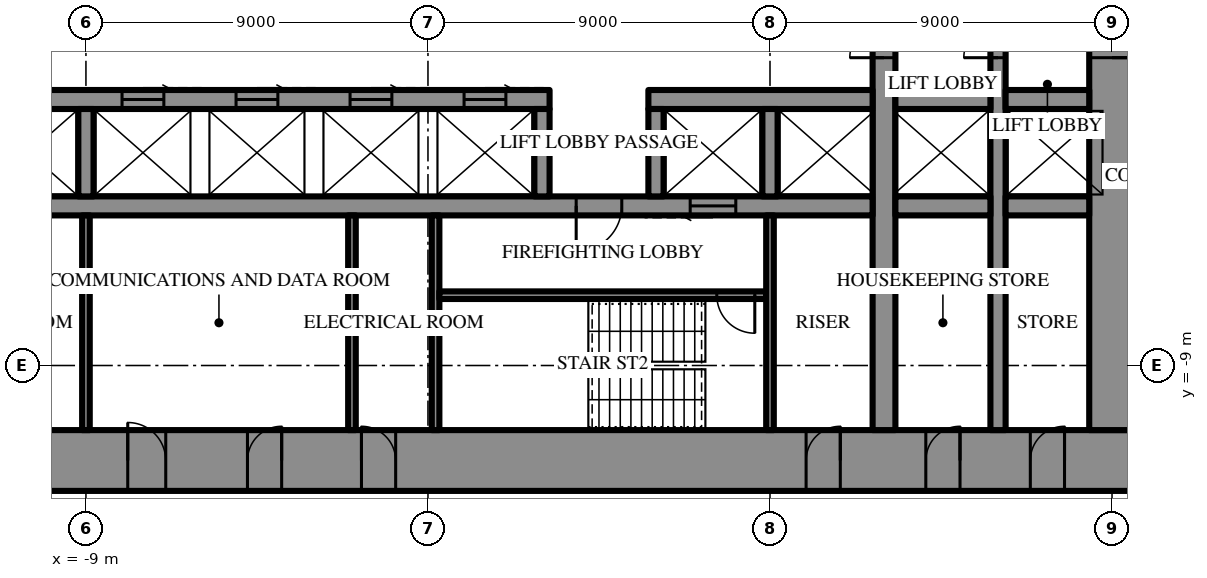
"""IFC4 building model, lengths in metres.
Left out: names, types, materials, properties, quantities, classifications, styles, units other than length and angle.
Written with IfcOpenShell. Run it as: python <this file> out.ifc"""

import sys

from ifc_helpers import new_model, si_unit, direction, frame, frame_2d, origin, place, context, subcontext, project, spatial, rectangle, extrude, element, fill, save


model = new_model("IFC4")
c1 = context("Model", 3, precision=1e-05, world=origin(), true_north=direction((0.0, 1.0)))
c2 = subcontext(c1, "Body", "Model", "MODEL_VIEW")
j1 = project(units=[si_unit("LENGTHUNIT", "METRE"), si_unit("PLANEANGLEUNIT", "RADIAN")], contexts=[c1])
p1 = place(None, origin())
s1 = spatial("IfcSite", under=j1, at=p1, CompositionType="ELEMENT")
p2 = place(p1, origin())
s2 = spatial("IfcBuilding", under=s1, at=p2, CompositionType="ELEMENT")
p3 = place(p2, frame((0.0, 0.0, 52.9)))
s3 = spatial("IfcBuildingStorey", under=s2, at=p3, CompositionType="ELEMENT", Elevation=52.9)
p4 = place(p3, frame((18.6, -11.5, 0.0), z_axis=(0.0, 0.0, 1.0), x_axis=(-1.0, 0.0, 0.0)))
e1 = element("IfcWall", 1, at=p4, inside=s3, PredefinedType="SHEAR", context=c2, shape_type="SweptSolid", body=[
    extrude(rectangle(XDim=37.2, YDim=1.6, at=frame_2d((18.6, 0.0))), origin(), (0.0, 0.0, 1.0), 4.2),
])
p5 = place(p4, frame((19.45, 0.0, 0.0)))
e2 = element("IfcOpeningElement", 2, at=p5, cuts=e1, PredefinedType="OPENING", context=c2, shape_type="SweptSolid", body=[
    extrude(rectangle(XDim=0.9, YDim=2.2, at=frame_2d((0.45, 1.1))), frame((0.0, 0.81, 0.0), z_axis=(0.0, -1.0, 0.0), x_axis=(1.0, 0.0, 0.0)), (0.0, 0.0, 1.0), 1.62),
])
p6 = place(p4, frame((22.45, 0.0, 0.0)))
e3 = element("IfcOpeningElement", 3, at=p6, cuts=e1, PredefinedType="OPENING", context=c2, shape_type="SweptSolid", body=[
    extrude(rectangle(XDim=0.9, YDim=2.2, at=frame_2d((0.45, 1.1))), frame((0.0, 0.81, 0.0), z_axis=(0.0, -1.0, 0.0), x_axis=(1.0, 0.0, 0.0)), (0.0, 0.0, 1.0), 1.62),
])
p7 = place(p4, frame((25.5, 0.0, 0.0)))
e4 = element("IfcOpeningElement", 4, at=p7, cuts=e1, PredefinedType="OPENING", context=c2, shape_type="SweptSolid", body=[
    extrude(rectangle(XDim=1.0, YDim=2.2, at=frame_2d((0.5, 1.1))), frame((0.0, 0.81, 0.0), z_axis=(0.0, -1.0, 0.0), x_axis=(1.0, 0.0, 0.0)), (0.0, 0.0, 1.0), 1.62),
])
p8 = place(p4, frame((1.85, 0.0, 0.0)))
e5 = element("IfcOpeningElement", 5, at=p8, cuts=e1, PredefinedType="OPENING", context=c2, shape_type="SweptSolid", body=[
    extrude(rectangle(XDim=0.9, YDim=2.2, at=frame_2d((0.45, 1.1))), frame((0.0, 0.81, 0.0), z_axis=(0.0, -1.0, 0.0), x_axis=(1.0, 0.0, 0.0)), (0.0, 0.0, 1.0), 1.62),
])
p9 = place(p4, frame((4.6, 0.0, 0.0)))
e6 = element("IfcOpeningElement", 6, at=p9, cuts=e1, PredefinedType="OPENING", context=c2, shape_type="SweptSolid", body=[
    extrude(rectangle(XDim=0.9, YDim=2.2, at=frame_2d((0.45, 1.1))), frame((0.0, 0.81, 0.0), z_axis=(0.0, -1.0, 0.0), x_axis=(1.0, 0.0, 0.0)), (0.0, 0.0, 1.0), 1.62),
])
p10 = place(p4, frame((7.75, 0.0, 0.0)))
e7 = element("IfcOpeningElement", 7, at=p10, cuts=e1, PredefinedType="OPENING", context=c2, shape_type="SweptSolid", body=[
    extrude(rectangle(XDim=0.9, YDim=2.2, at=frame_2d((0.45, 1.1))), frame((0.0, 0.81, 0.0), z_axis=(0.0, -1.0, 0.0), x_axis=(1.0, 0.0, 0.0)), (0.0, 0.0, 1.0), 1.62),
])
p11 = place(p4, frame((28.55, 0.0, 0.0)))
e8 = element("IfcOpeningElement", 8, at=p11, cuts=e1, PredefinedType="OPENING", context=c2, shape_type="SweptSolid", body=[
    extrude(rectangle(XDim=0.9, YDim=2.2, at=frame_2d((0.45, 1.1))), frame((0.0, 0.81, 0.0), z_axis=(0.0, -1.0, 0.0), x_axis=(1.0, 0.0, 0.0)), (0.0, 0.0, 1.0), 1.62),
])
p12 = place(p4, frame((31.7, 0.0, 0.0)))
e9 = element("IfcOpeningElement", 9, at=p12, cuts=e1, PredefinedType="OPENING", context=c2, shape_type="SweptSolid", body=[
    extrude(rectangle(XDim=0.9, YDim=2.2, at=frame_2d((0.45, 1.1))), frame((0.0, 0.81, 0.0), z_axis=(0.0, -1.0, 0.0), x_axis=(1.0, 0.0, 0.0)), (0.0, 0.0, 1.0), 1.62),
])
p13 = place(p4, frame((34.45, 0.0, 0.0)))
e10 = element("IfcOpeningElement", 10, at=p13, cuts=e1, PredefinedType="OPENING", context=c2, shape_type="SweptSolid", body=[
    extrude(rectangle(XDim=0.9, YDim=2.2, at=frame_2d((0.45, 1.1))), frame((0.0, 0.81, 0.0), z_axis=(0.0, -1.0, 0.0), x_axis=(1.0, 0.0, 0.0)), (0.0, 0.0, 1.0), 1.62),
])
p14 = place(p3, frame((18.0, -10.7, 0.0), z_axis=(0.0, 0.0, 1.0), x_axis=(0.0, 1.0, 0.0)))
e11 = element("IfcWall", 11, at=p14, inside=s3, PredefinedType="SHEAR", context=c2, shape_type="SweptSolid", body=[
    extrude(rectangle(XDim=21.4, YDim=1.2, at=frame_2d((10.7, 0.0))), origin(), (0.0, 0.0, 1.0), 4.2),
])
p15 = place(p14, frame((9.8, 0.0, 0.0)))
e12 = element("IfcOpeningElement", 12, at=p15, cuts=e11, PredefinedType="OPENING", context=c2, shape_type="SweptSolid", body=[
    extrude(rectangle(XDim=1.8, YDim=2.4, at=frame_2d((0.9, 1.2))), frame((0.0, 0.61, 0.0), z_axis=(0.0, -1.0, 0.0), x_axis=(1.0, 0.0, 0.0)), (0.0, 0.0, 1.0), 1.22),
])
p16 = place(p3, frame((12.0, -10.7, 0.0), z_axis=(0.0, 0.0, 1.0), x_axis=(0.0, 1.0, 0.0)))
e13 = element("IfcWall", 13, at=p16, inside=s3, PredefinedType="SHEAR", context=c2, shape_type="SweptSolid", body=[
    extrude(rectangle(XDim=21.4, YDim=0.6, at=frame_2d((10.7, 0.0))), origin(), (0.0, 0.0, 1.0), 4.2),
])
p17 = place(p16, frame((9.8, 0.0, 0.0)))
e14 = element("IfcOpeningElement", 14, at=p17, cuts=e13, PredefinedType="OPENING", context=c2, shape_type="SweptSolid", body=[
    extrude(rectangle(XDim=1.8, YDim=2.4, at=frame_2d((0.9, 1.2))), frame((0.0, 0.31, 0.0), z_axis=(0.0, -1.0, 0.0), x_axis=(1.0, 0.0, 0.0)), (0.0, 0.0, 1.0), 0.62),
])
p18 = place(p3, frame((15.0, -10.7, 0.0), z_axis=(0.0, 0.0, 1.0), x_axis=(0.0, 1.0, 0.0)))
e15 = element("IfcWall", 15, at=p18, inside=s3, PredefinedType="SHEAR", context=c2, shape_type="SweptSolid", body=[
    extrude(rectangle(XDim=21.4, YDim=0.4, at=frame_2d((10.7, 0.0))), origin(), (0.0, 0.0, 1.0), 4.2),
])
p19 = place(p18, frame((9.8, 0.0, 0.0)))
e16 = element("IfcOpeningElement", 16, at=p19, cuts=e15, PredefinedType="OPENING", context=c2, shape_type="SweptSolid", body=[
    extrude(rectangle(XDim=1.8, YDim=2.4, at=frame_2d((0.9, 1.2))), frame((0.0, 0.21, 0.0), z_axis=(0.0, -1.0, 0.0), x_axis=(1.0, 0.0, 0.0)), (0.0, 0.0, 1.0), 0.42),
])
p20 = place(p3, frame((17.4, -2.0, 0.0), z_axis=(0.0, 0.0, 1.0), x_axis=(-1.0, 0.0, 0.0)))
e17 = element("IfcWall", 17, at=p20, inside=s3, PredefinedType="SHEAR", context=c2, shape_type="SweptSolid", body=[
    extrude(rectangle(XDim=2.2, YDim=0.5, at=frame_2d((1.1, 0.0))), origin(), (0.0, 0.0, 1.0), 4.2),
])
p21 = place(p3, frame((14.8, -2.0, 0.0), z_axis=(0.0, 0.0, 1.0), x_axis=(-1.0, 0.0, 0.0)))
e18 = element("IfcWall", 18, at=p21, inside=s3, PredefinedType="SHEAR", context=c2, shape_type="SweptSolid", body=[
    extrude(rectangle(XDim=2.5, YDim=0.5, at=frame_2d((1.25, 0.0))), origin(), (0.0, 0.0, 1.0), 4.2),
])
p22 = place(p3, frame((11.7, -2.0, 0.0), z_axis=(0.0, 0.0, 1.0), x_axis=(-1.0, 0.0, 0.0)))
e19 = element("IfcWall", 19, at=p22, inside=s3, PredefinedType="SHEAR", context=c2, shape_type="SweptSolid", body=[
    extrude(rectangle(XDim=5.9, YDim=0.5, at=frame_2d((2.95, 0.0))), origin(), (0.0, 0.0, 1.0), 4.2),
])
p23 = place(p3, frame((3.2, -2.0, 0.0), z_axis=(0.0, 0.0, 1.0), x_axis=(-1.0, 0.0, 0.0)))
e20 = element("IfcWall", 20, at=p23, inside=s3, PredefinedType="SHEAR", context=c2, shape_type="SweptSolid", body=[
    extrude(rectangle(XDim=14.9, YDim=0.5, at=frame_2d((7.45, 0.0))), origin(), (0.0, 0.0, 1.0), 4.2),
])
p24 = place(p23, frame((1.15, 0.0, 0.0)))
e21 = element("IfcOpeningElement", 21, at=p24, cuts=e20, PredefinedType="OPENING", context=c2, shape_type="SweptSolid", body=[
    extrude(rectangle(XDim=1.1, YDim=2.2, at=frame_2d((0.55, 1.1))), frame((0.0, 0.26, 0.0), z_axis=(0.0, -1.0, 0.0), x_axis=(1.0, 0.0, 0.0)), (0.0, 0.0, 1.0), 0.52),
])
p25 = place(p23, frame((4.15, 0.0, 0.0)))
e22 = element("IfcOpeningElement", 22, at=p25, cuts=e20, PredefinedType="OPENING", context=c2, shape_type="SweptSolid", body=[
    extrude(rectangle(XDim=1.1, YDim=2.2, at=frame_2d((0.55, 1.1))), frame((0.0, 0.26, 0.0), z_axis=(0.0, -1.0, 0.0), x_axis=(1.0, 0.0, 0.0)), (0.0, 0.0, 1.0), 0.52),
])
p26 = place(p23, frame((7.15, 0.0, 0.0)))
e23 = element("IfcOpeningElement", 23, at=p26, cuts=e20, PredefinedType="OPENING", context=c2, shape_type="SweptSolid", body=[
    extrude(rectangle(XDim=1.1, YDim=2.2, at=frame_2d((0.55, 1.1))), frame((0.0, 0.26, 0.0), z_axis=(0.0, -1.0, 0.0), x_axis=(1.0, 0.0, 0.0)), (0.0, 0.0, 1.0), 0.52),
])
p27 = place(p23, frame((10.15, 0.0, 0.0)))
e24 = element("IfcOpeningElement", 24, at=p27, cuts=e20, PredefinedType="OPENING", context=c2, shape_type="SweptSolid", body=[
    extrude(rectangle(XDim=1.1, YDim=2.2, at=frame_2d((0.55, 1.1))), frame((0.0, 0.26, 0.0), z_axis=(0.0, -1.0, 0.0), x_axis=(1.0, 0.0, 0.0)), (0.0, 0.0, 1.0), 0.52),
])
p28 = place(p3, frame((17.4, -4.8, 0.0), z_axis=(0.0, 0.0, 1.0), x_axis=(-1.0, 0.0, 0.0)))
e25 = element("IfcWall", 25, at=p28, inside=s3, PredefinedType="SHEAR", context=c2, shape_type="SweptSolid", body=[
    extrude(rectangle(XDim=2.2, YDim=0.5, at=frame_2d((1.1, 0.0))), origin(), (0.0, 0.0, 1.0), 4.2),
])
p29 = place(p3, frame((14.8, -4.8, 0.0), z_axis=(0.0, 0.0, 1.0), x_axis=(-1.0, 0.0, 0.0)))
e26 = element("IfcWall", 26, at=p29, inside=s3, PredefinedType="SHEAR", context=c2, shape_type="SweptSolid", body=[
    extrude(rectangle(XDim=2.5, YDim=0.5, at=frame_2d((1.25, 0.0))), origin(), (0.0, 0.0, 1.0), 4.2),
])
p30 = place(p3, frame((11.7, -4.8, 0.0), z_axis=(0.0, 0.0, 1.0), x_axis=(-1.0, 0.0, 0.0)))
e27 = element("IfcWall", 27, at=p30, inside=s3, PredefinedType="SHEAR", context=c2, shape_type="SweptSolid", body=[
    extrude(rectangle(XDim=23.4, YDim=0.5, at=frame_2d((11.7, 0.0))), origin(), (0.0, 0.0, 1.0), 4.2),
])
p31 = place(p30, frame((6.6, 0.0, 0.0)))
e28 = element("IfcOpeningElement", 28, at=p31, cuts=e27, PredefinedType="OPENING", context=c2, shape_type="SweptSolid", body=[
    extrude(rectangle(XDim=1.2, YDim=2.2, at=frame_2d((0.6, 1.1))), frame((0.0, 0.26, 0.0), z_axis=(0.0, -1.0, 0.0), x_axis=(1.0, 0.0, 0.0)), (0.0, 0.0, 1.0), 0.52),
])
p32 = place(p30, frame((3.6, 0.0, 0.0)))
e29 = element("IfcOpeningElement", 29, at=p32, cuts=e27, PredefinedType="OPENING", context=c2, shape_type="SweptSolid", body=[
    extrude(rectangle(XDim=1.2, YDim=2.2, at=frame_2d((0.6, 1.1))), frame((0.0, 0.26, 0.0), z_axis=(0.0, -1.0, 0.0), x_axis=(1.0, 0.0, 0.0)), (0.0, 0.0, 1.0), 0.52),
])
for number, where, z_axis, x_axis in (
    (30, (9.0, -2.25, 0.0), (0.0, 0.0, 1.0), (0.0, -1.0, 0.0)),
    (31, (6.0, -2.25, 0.0), (0.0, 0.0, 1.0), (0.0, -1.0, 0.0)),
    (32, (3.0, -2.25, 0.0), (0.0, 0.0, 1.0), (0.0, -1.0, 0.0)),
    (33, (-9.0, -2.25, 0.0), (0.0, 0.0, 1.0), (0.0, -1.0, 0.0)),
):
    element("IfcWall", number, at=place(p3, frame(where, z_axis=z_axis, x_axis=x_axis)), inside=s3, PredefinedType="SHEAR", context=c2, shape_type="SweptSolid", body=[
        extrude(rectangle(XDim=2.3, YDim=0.4, at=frame_2d((1.15, 0.0))), origin(), (0.0, 0.0, 1.0), 4.2),
    ])
p33 = place(p3, frame((0.2, -5.05, 0.0), z_axis=(0.0, 0.0, 1.0), x_axis=(0.0, -1.0, 0.0)))
e34 = element("IfcWall", 34, at=p33, inside=s3, PredefinedType="SHEAR", context=c2, shape_type="SweptSolid", body=[
    extrude(rectangle(XDim=5.65, YDim=0.2, at=frame_2d((2.825, 0.0))), origin(), (0.0, 0.0, 1.0), 4.2),
])
p34 = place(p3, frame((8.9, -7.15, 0.0), z_axis=(0.0, 0.0, 1.0), x_axis=(-1.0, 0.0, 0.0)))
e35 = element("IfcWall", 35, at=p34, inside=s3, PredefinedType="SHEAR", context=c2, shape_type="SweptSolid", body=[
    extrude(rectangle(XDim=8.6, YDim=0.2, at=frame_2d((4.3, 0.0))), origin(), (0.0, 0.0, 1.0), 4.2),
])
p35 = place(p34, frame((0.3, 0.0, 0.0)))
e36 = element("IfcOpeningElement", 36, at=p35, cuts=e35, PredefinedType="OPENING", context=c2, shape_type="SweptSolid", body=[
    extrude(rectangle(XDim=1.0, YDim=2.2, at=frame_2d((0.5, 1.1))), frame((0.0, 0.11, 0.0), z_axis=(0.0, -1.0, 0.0), x_axis=(1.0, 0.0, 0.0)), (0.0, 0.0, 1.0), 0.22),
])
for number, where, z_axis, x_axis in (
    (37, (9.0, -5.05, 0.0), (0.0, 0.0, 1.0), (0.0, -1.0, 0.0)),
    (38, (-9.0, -5.05, 0.0), (0.0, 0.0, 1.0), (0.0, -1.0, 0.0)),
    (39, (-2.0, -5.05, 0.0), (0.0, 0.0, 1.0), (0.0, -1.0, 0.0)),
):
    element("IfcWall", number, at=place(p3, frame(where, z_axis=z_axis, x_axis=x_axis)), inside=s3, PredefinedType="PARTITIONING", context=c2, shape_type="SweptSolid", body=[
        extrude(rectangle(XDim=5.65, YDim=0.2, at=frame_2d((2.825, 0.0))), origin(), (0.0, 0.0, 1.0), 4.0),
    ])
p36 = place(p3, frame((17.511, -22.67, 0.0), z_axis=(0.0, 0.0, 1.0), x_axis=(0.500000289772, 0.866025236485, 0.0)))
e40 = element("IfcWall", 40, at=p36, inside=s3, PredefinedType="PARTITIONING", context=c2, shape_type="SweptSolid", body=[
    extrude(rectangle(XDim=21.754, YDim=0.2, at=frame_2d((10.877, 0.0))), origin(), (0.0, 0.0, 1.0), 4.0),
])
p37 = place(p36, frame((4.589, 0.0, 0.0)))
e41 = element("IfcOpeningElement", 41, at=p37, cuts=e40, PredefinedType="OPENING", context=c2, shape_type="SweptSolid", body=[
    extrude(rectangle(XDim=1.8, YDim=2.4, at=frame_2d((0.9, 1.2))), frame((0.0, 0.11, 0.0), z_axis=(0.0, -1.0, 0.0), x_axis=(1.0, 0.0, 0.0)), (0.0, 0.0, 1.0), 0.22),
])
p38 = place(p36, frame((15.366, 0.0, 0.0)))
e42 = element("IfcOpeningElement", 42, at=p38, cuts=e40, PredefinedType="OPENING", context=c2, shape_type="SweptSolid", body=[
    extrude(rectangle(XDim=1.8, YDim=2.4, at=frame_2d((0.9, 1.2))), frame((0.0, 0.11, 0.0), z_axis=(0.0, -1.0, 0.0), x_axis=(1.0, 0.0, 0.0)), (0.0, 0.0, 1.0), 0.22),
])
p39 = place(p15, frame((1.8, 0.0, 0.0), z_axis=(0.0, 0.0, 1.0), x_axis=(-1.0, 0.0, 0.0)))
e43 = element("IfcDoor", 43, at=p39, inside=s3, OperationType="DOUBLE_DOOR_SINGLE_SWING", PredefinedType="DOOR", context=c2, shape_type="SweptSolid", body=[
    extrude(rectangle(XDim=1.8, YDim=2.4, at=frame_2d((0.9, 1.2))), frame((0.0, 0.025, 0.0), z_axis=(0.0, -1.0, 0.0), x_axis=(1.0, 0.0, 0.0)), (0.0, 0.0, 1.0), 0.05),
])
fill(e12, e43)
p40 = place(p31, origin())
e44 = element("IfcDoor", 44, at=p40, inside=s3, OperationType="SINGLE_SWING_LEFT", PredefinedType="DOOR", context=c2, shape_type="SweptSolid", body=[
    extrude(rectangle(XDim=1.2, YDim=2.2, at=frame_2d((0.6, 1.1))), frame((0.0, 0.025, 0.0), z_axis=(0.0, -1.0, 0.0), x_axis=(1.0, 0.0, 0.0)), (0.0, 0.0, 1.0), 0.05),
])
fill(e28, e44)
p41 = place(p35, origin())
e45 = element("IfcDoor", 45, at=p41, inside=s3, OperationType="SINGLE_SWING_RIGHT", PredefinedType="DOOR", context=c2, shape_type="SweptSolid", body=[
    extrude(rectangle(XDim=1.0, YDim=2.2, at=frame_2d((0.5, 1.1))), frame((0.0, 0.025, 0.0), z_axis=(0.0, -1.0, 0.0), x_axis=(1.0, 0.0, 0.0)), (0.0, 0.0, 1.0), 0.05),
])
fill(e36, e45)
p42 = place(p5, frame((0.9, 0.0, 0.0), z_axis=(0.0, 0.0, 1.0), x_axis=(-1.0, 0.0, 0.0)))
e46 = element("IfcDoor", 46, at=p42, inside=s3, OperationType="SINGLE_SWING_RIGHT", PredefinedType="DOOR", context=c2, shape_type="SweptSolid", body=[
    extrude(rectangle(XDim=0.9, YDim=2.2, at=frame_2d((0.45, 1.1))), frame((0.0, 0.025, 0.0), z_axis=(0.0, -1.0, 0.0), x_axis=(1.0, 0.0, 0.0)), (0.0, 0.0, 1.0), 0.05),
])
fill(e2, e46)
p43 = place(p6, frame((0.9, 0.0, 0.0), z_axis=(0.0, 0.0, 1.0), x_axis=(-1.0, 0.0, 0.0)))
e47 = element("IfcDoor", 47, at=p43, inside=s3, OperationType="SINGLE_SWING_LEFT", PredefinedType="DOOR", context=c2, shape_type="SweptSolid", body=[
    extrude(rectangle(XDim=0.9, YDim=2.2, at=frame_2d((0.45, 1.1))), frame((0.0, 0.025, 0.0), z_axis=(0.0, -1.0, 0.0), x_axis=(1.0, 0.0, 0.0)), (0.0, 0.0, 1.0), 0.05),
])
fill(e3, e47)
p44 = place(p7, frame((1.0, 0.0, 0.0), z_axis=(0.0, 0.0, 1.0), x_axis=(-1.0, 0.0, 0.0)))
e48 = element("IfcDoor", 48, at=p44, inside=s3, OperationType="SINGLE_SWING_RIGHT", PredefinedType="DOOR", context=c2, shape_type="SweptSolid", body=[
    extrude(rectangle(XDim=1.0, YDim=2.2, at=frame_2d((0.5, 1.1))), frame((0.0, 0.025, 0.0), z_axis=(0.0, -1.0, 0.0), x_axis=(1.0, 0.0, 0.0)), (0.0, 0.0, 1.0), 0.05),
])
fill(e4, e48)
p45 = place(p8, frame((0.9, 0.0, 0.0), z_axis=(0.0, 0.0, 1.0), x_axis=(-1.0, 0.0, 0.0)))
e49 = element("IfcDoor", 49, at=p45, inside=s3, OperationType="SINGLE_SWING_LEFT", PredefinedType="DOOR", context=c2, shape_type="SweptSolid", body=[
    extrude(rectangle(XDim=0.9, YDim=2.2, at=frame_2d((0.45, 1.1))), frame((0.0, 0.025, 0.0), z_axis=(0.0, -1.0, 0.0), x_axis=(1.0, 0.0, 0.0)), (0.0, 0.0, 1.0), 0.05),
])
fill(e5, e49)
p46 = place(p9, frame((0.9, 0.0, 0.0), z_axis=(0.0, 0.0, 1.0), x_axis=(-1.0, 0.0, 0.0)))
e50 = element("IfcDoor", 50, at=p46, inside=s3, OperationType="SINGLE_SWING_LEFT", PredefinedType="DOOR", context=c2, shape_type="SweptSolid", body=[
    extrude(rectangle(XDim=0.9, YDim=2.2, at=frame_2d((0.45, 1.1))), frame((0.0, 0.025, 0.0), z_axis=(0.0, -1.0, 0.0), x_axis=(1.0, 0.0, 0.0)), (0.0, 0.0, 1.0), 0.05),
])
fill(e6, e50)
p47 = place(p10, frame((0.9, 0.0, 0.0), z_axis=(0.0, 0.0, 1.0), x_axis=(-1.0, 0.0, 0.0)))
e51 = element("IfcDoor", 51, at=p47, inside=s3, OperationType="SINGLE_SWING_LEFT", PredefinedType="DOOR", context=c2, shape_type="SweptSolid", body=[
    extrude(rectangle(XDim=0.9, YDim=2.2, at=frame_2d((0.45, 1.1))), frame((0.0, 0.025, 0.0), z_axis=(0.0, -1.0, 0.0), x_axis=(1.0, 0.0, 0.0)), (0.0, 0.0, 1.0), 0.05),
])
fill(e7, e51)
p48 = place(p17, origin())
e52 = element("IfcDoor", 52, at=p48, inside=s3, OperationType="DOUBLE_DOOR_SINGLE_SWING", PredefinedType="DOOR", context=c2, shape_type="SweptSolid", body=[
    extrude(rectangle(XDim=1.8, YDim=2.4, at=frame_2d((0.9, 1.2))), frame((0.0, 0.025, 0.0), z_axis=(0.0, -1.0, 0.0), x_axis=(1.0, 0.0, 0.0)), (0.0, 0.0, 1.0), 0.05),
])
fill(e14, e52)
p49 = place(p19, origin())
e53 = element("IfcDoor", 53, at=p49, inside=s3, OperationType="DOUBLE_DOOR_SINGLE_SWING", PredefinedType="DOOR", context=c2, shape_type="SweptSolid", body=[
    extrude(rectangle(XDim=1.8, YDim=2.4, at=frame_2d((0.9, 1.2))), frame((0.0, 0.025, 0.0), z_axis=(0.0, -1.0, 0.0), x_axis=(1.0, 0.0, 0.0)), (0.0, 0.0, 1.0), 0.05),
])
fill(e16, e53)
p50 = place(p32, origin())
e54 = element("IfcDoor", 54, at=p50, inside=s3, OperationType="SLIDING_TO_LEFT", PredefinedType="DOOR", context=c2, shape_type="SweptSolid", body=[
    extrude(rectangle(XDim=1.2, YDim=2.2, at=frame_2d((0.6, 1.1))), frame((0.0, 0.025, 0.0), z_axis=(0.0, -1.0, 0.0), x_axis=(1.0, 0.0, 0.0)), (0.0, 0.0, 1.0), 0.05),
])
fill(e29, e54)
p51 = place(p24, frame((1.1, 0.0, 0.0), z_axis=(0.0, 0.0, 1.0), x_axis=(-1.0, 0.0, 0.0)))
e55 = element("IfcDoor", 55, at=p51, inside=s3, OperationType="SLIDING_TO_LEFT", PredefinedType="DOOR", context=c2, shape_type="SweptSolid", body=[
    extrude(rectangle(XDim=1.1, YDim=2.2, at=frame_2d((0.55, 1.1))), frame((0.0, 0.025, 0.0), z_axis=(0.0, -1.0, 0.0), x_axis=(1.0, 0.0, 0.0)), (0.0, 0.0, 1.0), 0.05),
])
fill(e21, e55)
p52 = place(p25, frame((1.1, 0.0, 0.0), z_axis=(0.0, 0.0, 1.0), x_axis=(-1.0, 0.0, 0.0)))
e56 = element("IfcDoor", 56, at=p52, inside=s3, OperationType="SLIDING_TO_LEFT", PredefinedType="DOOR", context=c2, shape_type="SweptSolid", body=[
    extrude(rectangle(XDim=1.1, YDim=2.2, at=frame_2d((0.55, 1.1))), frame((0.0, 0.025, 0.0), z_axis=(0.0, -1.0, 0.0), x_axis=(1.0, 0.0, 0.0)), (0.0, 0.0, 1.0), 0.05),
])
fill(e22, e56)
p53 = place(p26, frame((1.1, 0.0, 0.0), z_axis=(0.0, 0.0, 1.0), x_axis=(-1.0, 0.0, 0.0)))
e57 = element("IfcDoor", 57, at=p53, inside=s3, OperationType="SLIDING_TO_LEFT", PredefinedType="DOOR", context=c2, shape_type="SweptSolid", body=[
    extrude(rectangle(XDim=1.1, YDim=2.2, at=frame_2d((0.55, 1.1))), frame((0.0, 0.025, 0.0), z_axis=(0.0, -1.0, 0.0), x_axis=(1.0, 0.0, 0.0)), (0.0, 0.0, 1.0), 0.05),
])
fill(e23, e57)
p54 = place(p27, frame((1.1, 0.0, 0.0), z_axis=(0.0, 0.0, 1.0), x_axis=(-1.0, 0.0, 0.0)))
e58 = element("IfcDoor", 58, at=p54, inside=s3, OperationType="SLIDING_TO_LEFT", PredefinedType="DOOR", context=c2, shape_type="SweptSolid", body=[
    extrude(rectangle(XDim=1.1, YDim=2.2, at=frame_2d((0.55, 1.1))), frame((0.0, 0.025, 0.0), z_axis=(0.0, -1.0, 0.0), x_axis=(1.0, 0.0, 0.0)), (0.0, 0.0, 1.0), 0.05),
])
fill(e24, e58)
save(model, sys.argv[1])
